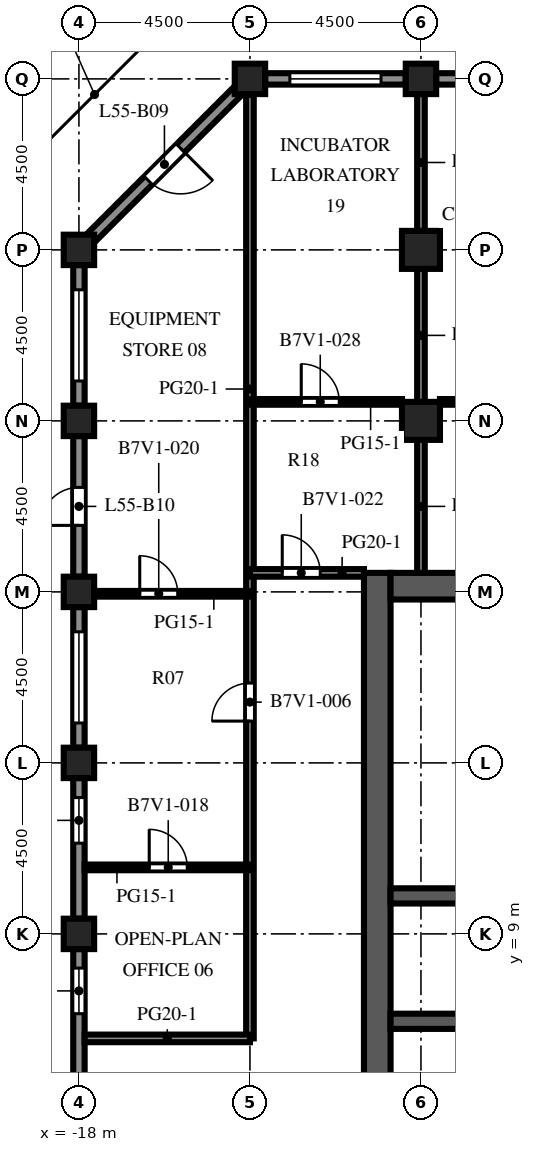
"""IFC4 building model, lengths in metres.
Left out: names, types, materials, properties, quantities, classifications, styles, units other than length and angle.
Written with IfcOpenShell. Run it as: python <this file> out.ifc"""

import sys

from ifc_helpers import new_model, si_unit, direction, frame, frame_2d, origin, origin_2d, place, context, subcontext, project, spatial, rectangle, extrude, element, fill, save


model = new_model("IFC4")
c1 = context("Model", 3, precision=1e-05, world=origin(), true_north=direction((0.0, 1.0)))
c2 = subcontext(c1, "Body", "Model", "MODEL_VIEW")
j1 = project(units=[si_unit("LENGTHUNIT", "METRE"), si_unit("PLANEANGLEUNIT", "RADIAN")], contexts=[c1])
p1 = place(None, origin())
s1 = spatial("IfcSite", under=j1, at=p1, CompositionType="ELEMENT")
p2 = place(p1, origin())
s2 = spatial("IfcBuilding", under=s1, at=p2, CompositionType="ELEMENT")
p3 = place(p2, frame((0.0, 0.0, 243.9)))
s3 = spatial("IfcBuildingStorey", under=s2, at=p3, CompositionType="ELEMENT", Elevation=243.9)
for number, where, z_axis, x_axis in (
    (1, (-18.0, 9.0, 0.0), (0.0, 0.0, 1.0), (1.0, 0.0, 0.0)),
    (2, (-18.0, 13.5, 0.0), (0.0, 0.0, 1.0), (1.0, 0.0, 0.0)),
    (3, (-18.0, 18.0, 0.0), (0.0, 0.0, 1.0), (1.0, 0.0, 0.0)),
    (4, (-18.0, 22.5, 0.0), (0.0, 0.0, 1.0), (1.0, 0.0, 0.0)),
    (5, (-18.0, 27.0, 0.0), (0.0, 0.0, 1.0), (1.0, 0.0, 0.0)),
    (6, (-13.5, 31.5, 0.0), (0.0, 0.0, 1.0), (1.0, 0.0, 0.0)),
    (7, (-9.0, 31.5, 0.0), (0.0, 0.0, 1.0), (1.0, 0.0, 0.0)),
):
    element("IfcColumn", number, at=place(p3, frame(where, z_axis=z_axis, x_axis=x_axis)), inside=s3, PredefinedType="COLUMN", context=c2, shape_type="SweptSolid", body=[
        extrude(rectangle(XDim=0.8, YDim=0.8, at=origin_2d()), origin(), (0.0, 0.0, 1.0), 4.1),
    ])
for number, where, z_axis, x_axis in (
    (8, (-9.0, 22.5, 0.0), (0.0, 0.0, 1.0), (1.0, 0.0, 0.0)),
    (9, (-9.0, 27.0, 0.0), (0.0, 0.0, 1.0), (1.0, 0.0, 0.0)),
):
    element("IfcColumn", number, at=place(p3, frame(where, z_axis=z_axis, x_axis=x_axis)), inside=s3, PredefinedType="COLUMN", context=c2, shape_type="SweptSolid", body=[
        extrude(rectangle(XDim=1.0, YDim=1.0, at=origin_2d()), origin(), (0.0, 0.0, 1.0), 4.1),
    ])
p4 = place(p3, frame((-10.15, -9.0, 0.0), z_axis=(0.0, 0.0, 1.0), x_axis=(0.0, 1.0, 0.0)))
e10 = element("IfcWall", 10, at=p4, inside=s3, PredefinedType="SHEAR", context=c2, shape_type="SweptSolid", body=[
    extrude(rectangle(XDim=27.5, YDim=0.7, at=frame_2d((13.75, 0.0))), origin(), (0.0, 0.0, 1.0), 4.1),
])
p5 = place(p4, frame((12.55, 0.0, 0.0)))
e11 = element("IfcOpeningElement", 11, at=p5, cuts=e10, PredefinedType="OPENING", context=c2, shape_type="SweptSolid", body=[
    extrude(rectangle(XDim=2.4, YDim=2.4, at=frame_2d((1.2, 1.2))), frame((0.0, 0.36, 0.0), z_axis=(0.0, -1.0, 0.0), x_axis=(1.0, 0.0, 0.0)), (0.0, 0.0, 1.0), 0.72),
])
p6 = place(p4, frame((6.825, 0.0, 0.0)))
e12 = element("IfcOpeningElement", 12, at=p6, cuts=e10, PredefinedType="OPENING", context=c2, shape_type="SweptSolid", body=[
    extrude(rectangle(XDim=1.2, YDim=2.1, at=frame_2d((0.6, 1.05))), frame((0.0, 0.36, 0.0), z_axis=(0.0, -1.0, 0.0), x_axis=(1.0, 0.0, 0.0)), (0.0, 0.0, 1.0), 0.72),
])
p7 = place(p4, frame((19.475, 0.0, 0.0)))
e13 = element("IfcOpeningElement", 13, at=p7, cuts=e10, PredefinedType="OPENING", context=c2, shape_type="SweptSolid", body=[
    extrude(rectangle(XDim=1.2, YDim=2.1, at=frame_2d((0.6, 1.05))), frame((0.0, 0.36, 0.0), z_axis=(0.0, -1.0, 0.0), x_axis=(1.0, 0.0, 0.0)), (0.0, 0.0, 1.0), 0.72),
])
p8 = place(p3, frame((-9.8, 18.15, 0.0), z_axis=(0.0, 0.0, 1.0), x_axis=(1.0, 0.0, 0.0)))
e14 = element("IfcWall", 14, at=p8, inside=s3, PredefinedType="SHEAR", context=c2, shape_type="SweptSolid", body=[
    extrude(rectangle(XDim=10.6, YDim=0.7, at=frame_2d((5.3, 0.0))), origin(), (0.0, 0.0, 1.0), 4.1),
])
p9 = place(p3, frame((-9.8, 6.7, 0.0), z_axis=(0.0, 0.0, 1.0), x_axis=(1.0, 0.0, 0.0)))
e15 = element("IfcWall", 15, at=p9, inside=s3, PredefinedType="SHEAR", context=c2, shape_type="SweptSolid", body=[
    extrude(rectangle(XDim=10.6, YDim=0.4, at=frame_2d((5.3, 0.0))), origin(), (0.0, 0.0, 1.0), 4.1),
])
p10 = place(p9, frame((3.438, 0.0, 0.0)))
e16 = element("IfcOpeningElement", 16, at=p10, cuts=e15, PredefinedType="OPENING", context=c2, shape_type="SweptSolid", body=[
    extrude(rectangle(XDim=1.1, YDim=2.1, at=frame_2d((0.55, 1.05))), frame((0.0, 0.21, 0.0), z_axis=(0.0, -1.0, 0.0), x_axis=(1.0, 0.0, 0.0)), (0.0, 0.0, 1.0), 0.42),
])
p11 = place(p9, frame((6.062, 0.0, 0.0)))
e17 = element("IfcOpeningElement", 17, at=p11, cuts=e15, PredefinedType="OPENING", context=c2, shape_type="SweptSolid", body=[
    extrude(rectangle(XDim=1.1, YDim=2.1, at=frame_2d((0.55, 1.05))), frame((0.0, 0.21, 0.0), z_axis=(0.0, -1.0, 0.0), x_axis=(1.0, 0.0, 0.0)), (0.0, 0.0, 1.0), 0.42),
])
p12 = place(p9, frame((8.812, 0.0, 0.0)))
e18 = element("IfcOpeningElement", 18, at=p12, cuts=e15, PredefinedType="OPENING", context=c2, shape_type="SweptSolid", body=[
    extrude(rectangle(XDim=1.1, YDim=2.1, at=frame_2d((0.55, 1.05))), frame((0.0, 0.21, 0.0), z_axis=(0.0, -1.0, 0.0), x_axis=(1.0, 0.0, 0.0)), (0.0, 0.0, 1.0), 0.42),
])
p13 = place(p9, frame((0.738, 0.0, 0.0)))
e19 = element("IfcOpeningElement", 19, at=p13, cuts=e15, PredefinedType="OPENING", context=c2, shape_type="SweptSolid", body=[
    extrude(rectangle(XDim=1.0, YDim=2.1, at=frame_2d((0.5, 1.05))), frame((0.0, 0.21, 0.0), z_axis=(0.0, -1.0, 0.0), x_axis=(1.0, 0.0, 0.0)), (0.0, 0.0, 1.0), 0.42),
])
p14 = place(p3, frame((-9.8, 10.0, 0.0), z_axis=(0.0, 0.0, 1.0), x_axis=(1.0, 0.0, 0.0)))
e20 = element("IfcWall", 20, at=p14, inside=s3, PredefinedType="SHEAR", context=c2, shape_type="SweptSolid", body=[
    extrude(rectangle(XDim=10.6, YDim=0.4, at=frame_2d((5.3, 0.0))), origin(), (0.0, 0.0, 1.0), 4.1),
])
p15 = place(p3, frame((-8.6, 31.5, 0.0), z_axis=(0.0, 0.0, 1.0), x_axis=(1.0, 0.0, 0.0)))
e21 = element("IfcWall", 21, at=p15, inside=s3, PredefinedType="SOLIDWALL", context=c2, shape_type="SweptSolid", body=[
    extrude(rectangle(XDim=3.7, YDim=0.3, at=frame_2d((1.85, 0.0))), origin(), (0.0, 0.0, 1.0), 2.85),
])
p16 = place(p15, frame((1.35, 0.0, 0.0)))
e22 = element("IfcOpeningElement", 22, at=p16, cuts=e21, PredefinedType="OPENING", context=c2, shape_type="SweptSolid", body=[
    extrude(rectangle(XDim=1.0, YDim=2.2, at=frame_2d((0.5, 1.1))), frame((0.0, 0.16, 0.0), z_axis=(0.0, -1.0, 0.0), x_axis=(1.0, 0.0, 0.0)), (0.0, 0.0, 1.0), 0.32),
])
p17 = place(p3, frame((-13.1, 31.5, 0.0), z_axis=(0.0, 0.0, 1.0), x_axis=(1.0, 0.0, 0.0)))
e23 = element("IfcWall", 23, at=p17, inside=s3, PredefinedType="SOLIDWALL", context=c2, shape_type="SweptSolid", body=[
    extrude(rectangle(XDim=3.7, YDim=0.3, at=frame_2d((1.85, 0.0))), origin(), (0.0, 0.0, 1.0), 2.85),
])
p18 = place(p17, frame((0.65, 0.0, 0.8)))
e24 = element("IfcOpeningElement", 24, at=p18, cuts=e23, PredefinedType="OPENING", context=c2, shape_type="SweptSolid", body=[
    extrude(rectangle(XDim=2.4, YDim=1.7, at=frame_2d((1.2, 0.85))), frame((0.0, 0.16, 0.0), z_axis=(0.0, -1.0, 0.0), x_axis=(1.0, 0.0, 0.0)), (0.0, 0.0, 1.0), 0.32),
])
p19 = place(p3, frame((-17.706, 27.294, 0.0), z_axis=(0.0, 0.0, 1.0), x_axis=(0.707106781187, 0.707106781187, 0.0)))
e25 = element("IfcWall", 25, at=p19, inside=s3, PredefinedType="SOLIDWALL", context=c2, shape_type="SweptSolid", body=[
    extrude(rectangle(XDim=5.532, YDim=0.3, at=frame_2d((2.766, 0.0))), origin(), (0.0, 0.0, 1.0), 2.85),
])
p20 = place(p19, frame((2.166, 0.0, 0.0)))
e26 = element("IfcOpeningElement", 26, at=p20, cuts=e25, PredefinedType="OPENING", context=c2, shape_type="SweptSolid", body=[
    extrude(rectangle(XDim=1.2, YDim=2.2, at=frame_2d((0.6, 1.1))), frame((0.0, 0.16, 0.0), z_axis=(0.0, -1.0, 0.0), x_axis=(1.0, 0.0, 0.0)), (0.0, 0.0, 1.0), 0.32),
])
p21 = place(p3, frame((-18.0, 22.9, 0.0), z_axis=(0.0, 0.0, 1.0), x_axis=(0.0, 1.0, 0.0)))
e27 = element("IfcWall", 27, at=p21, inside=s3, PredefinedType="SOLIDWALL", context=c2, shape_type="SweptSolid", body=[
    extrude(rectangle(XDim=3.7, YDim=0.3, at=frame_2d((1.85, 0.0))), origin(), (0.0, 0.0, 1.0), 2.85),
])
p22 = place(p21, frame((0.65, 0.0, 0.8)))
e28 = element("IfcOpeningElement", 28, at=p22, cuts=e27, PredefinedType="OPENING", context=c2, shape_type="SweptSolid", body=[
    extrude(rectangle(XDim=2.4, YDim=1.7, at=frame_2d((1.2, 0.85))), frame((0.0, 0.16, 0.0), z_axis=(0.0, -1.0, 0.0), x_axis=(1.0, 0.0, 0.0)), (0.0, 0.0, 1.0), 0.32),
])
p23 = place(p3, frame((-18.0, 18.4, 0.0), z_axis=(0.0, 0.0, 1.0), x_axis=(0.0, 1.0, 0.0)))
e29 = element("IfcWall", 29, at=p23, inside=s3, PredefinedType="SOLIDWALL", context=c2, shape_type="SweptSolid", body=[
    extrude(rectangle(XDim=3.7, YDim=0.3, at=frame_2d((1.85, 0.0))), origin(), (0.0, 0.0, 1.0), 2.85),
])
p24 = place(p23, frame((1.35, 0.0, 0.0)))
e30 = element("IfcOpeningElement", 30, at=p24, cuts=e29, PredefinedType="OPENING", context=c2, shape_type="SweptSolid", body=[
    extrude(rectangle(XDim=1.0, YDim=2.2, at=frame_2d((0.5, 1.1))), frame((0.0, 0.16, 0.0), z_axis=(0.0, -1.0, 0.0), x_axis=(1.0, 0.0, 0.0)), (0.0, 0.0, 1.0), 0.32),
])
p25 = place(p3, frame((-18.0, 13.9, 0.0), z_axis=(0.0, 0.0, 1.0), x_axis=(0.0, 1.0, 0.0)))
e31 = element("IfcWall", 31, at=p25, inside=s3, PredefinedType="SOLIDWALL", context=c2, shape_type="SweptSolid", body=[
    extrude(rectangle(XDim=3.7, YDim=0.3, at=frame_2d((1.85, 0.0))), origin(), (0.0, 0.0, 1.0), 2.85),
])
p26 = place(p25, frame((0.65, 0.0, 0.8)))
e32 = element("IfcOpeningElement", 32, at=p26, cuts=e31, PredefinedType="OPENING", context=c2, shape_type="SweptSolid", body=[
    extrude(rectangle(XDim=2.4, YDim=1.7, at=frame_2d((1.2, 0.85))), frame((0.0, 0.16, 0.0), z_axis=(0.0, -1.0, 0.0), x_axis=(1.0, 0.0, 0.0)), (0.0, 0.0, 1.0), 0.32),
])
p27 = place(p3, frame((-18.0, 9.4, 0.0), z_axis=(0.0, 0.0, 1.0), x_axis=(0.0, 1.0, 0.0)))
e33 = element("IfcWall", 33, at=p27, inside=s3, PredefinedType="SOLIDWALL", context=c2, shape_type="SweptSolid", body=[
    extrude(rectangle(XDim=3.7, YDim=0.3, at=frame_2d((1.85, 0.0))), origin(), (0.0, 0.0, 1.0), 2.85),
])
p28 = place(p27, frame((1.988, 0.0, 0.8)))
e34 = element("IfcOpeningElement", 34, at=p28, cuts=e33, PredefinedType="OPENING", context=c2, shape_type="SweptSolid", body=[
    extrude(rectangle(XDim=1.2, YDim=1.7, at=frame_2d((0.6, 0.85))), frame((0.0, 0.16, 0.0), z_axis=(0.0, -1.0, 0.0), x_axis=(1.0, 0.0, 0.0)), (0.0, 0.0, 1.0), 0.32),
])
p29 = place(p3, frame((-18.0, 4.9, 0.0), z_axis=(0.0, 0.0, 1.0), x_axis=(0.0, 1.0, 0.0)))
e35 = element("IfcWall", 35, at=p29, inside=s3, PredefinedType="SOLIDWALL", context=c2, shape_type="SweptSolid", body=[
    extrude(rectangle(XDim=3.7, YDim=0.3, at=frame_2d((1.85, 0.0))), origin(), (0.0, 0.0, 1.0), 2.85),
])
p30 = place(p29, frame((2.0, 0.0, 0.8)))
e36 = element("IfcOpeningElement", 36, at=p30, cuts=e35, PredefinedType="OPENING", context=c2, shape_type="SweptSolid", body=[
    extrude(rectangle(XDim=1.2, YDim=1.7, at=frame_2d((0.6, 0.85))), frame((0.0, 0.16, 0.0), z_axis=(0.0, -1.0, 0.0), x_axis=(1.0, 0.0, 0.0)), (0.0, 0.0, 1.0), 0.32),
])
p31 = place(p3, frame((-13.5, 6.25, 0.0), z_axis=(0.0, 0.0, 1.0), x_axis=(0.0, 1.0, 0.0)))
e37 = element("IfcWall", 37, at=p31, inside=s3, PredefinedType="PARTITIONING", context=c2, shape_type="SweptSolid", body=[
    extrude(rectangle(XDim=24.827, YDim=0.2, at=frame_2d((12.414, 0.0))), origin(), (0.0, 0.0, 1.0), 3.65),
])
p32 = place(p31, frame((8.35, 0.0, 0.0)))
e38 = element("IfcOpeningElement", 38, at=p32, cuts=e37, PredefinedType="OPENING", context=c2, shape_type="SweptSolid", body=[
    extrude(rectangle(XDim=1.0, YDim=2.1, at=frame_2d((0.5, 1.05))), frame((0.0, 0.11, 0.0), z_axis=(0.0, -1.0, 0.0), x_axis=(1.0, 0.0, 0.0)), (0.0, 0.0, 1.0), 0.22),
])
for number, where, z_axis, x_axis in (
    (39, (-9.0, 18.5, 0.0), (0.0, 0.0, 1.0), (0.0, 1.0, 0.0)),
    (40, (-9.0, 23.0, 0.0), (0.0, 0.0, 1.0), (0.0, 1.0, 0.0)),
):
    element("IfcWall", number, at=place(p3, frame(where, z_axis=z_axis, x_axis=x_axis)), inside=s3, PredefinedType="PARTITIONING", context=c2, shape_type="SweptSolid", body=[
        extrude(rectangle(XDim=3.5, YDim=0.2, at=frame_2d((1.75, 0.0))), origin(), (0.0, 0.0, 1.0), 3.65),
    ])
p33 = place(p3, frame((-9.0, 27.5, 0.0), z_axis=(0.0, 0.0, 1.0), x_axis=(0.0, 1.0, 0.0)))
e41 = element("IfcWall", 41, at=p33, inside=s3, PredefinedType="PARTITIONING", context=c2, shape_type="SweptSolid", body=[
    extrude(rectangle(XDim=3.6, YDim=0.2, at=frame_2d((1.8, 0.0))), origin(), (0.0, 0.0, 1.0), 3.65),
])
p34 = place(p3, frame((-17.85, 6.25, 0.0), z_axis=(0.0, 0.0, 1.0), x_axis=(1.0, 0.0, 0.0)))
e42 = element("IfcWall", 42, at=p34, inside=s3, PredefinedType="PARTITIONING", context=c2, shape_type="SweptSolid", body=[
    extrude(rectangle(XDim=4.35, YDim=0.2, at=frame_2d((2.175, 0.0))), origin(), (0.0, 0.0, 1.0), 3.65),
])
p35 = place(p3, frame((-13.5, 10.75, 0.0), z_axis=(0.0, 0.0, 1.0), x_axis=(-1.0, 0.0, 0.0)))
e43 = element("IfcWall", 43, at=p35, inside=s3, PredefinedType="PARTITIONING", context=c2, shape_type="SweptSolid", body=[
    extrude(rectangle(XDim=4.35, YDim=0.15, at=frame_2d((2.175, 0.0))), origin(), (0.0, 0.0, 1.0), 3.65),
])
p36 = place(p35, frame((1.65, 0.0, 0.0)))
e44 = element("IfcOpeningElement", 44, at=p36, cuts=e43, PredefinedType="OPENING", context=c2, shape_type="SweptSolid", body=[
    extrude(rectangle(XDim=1.0, YDim=2.1, at=frame_2d((0.5, 1.05))), frame((0.0, 0.085, 0.0), z_axis=(0.0, -1.0, 0.0), x_axis=(1.0, 0.0, 0.0)), (0.0, 0.0, 1.0), 0.17),
])
p37 = place(p3, frame((-17.6, 17.95, 0.0), z_axis=(0.0, 0.0, 1.0), x_axis=(1.0, 0.0, 0.0)))
e45 = element("IfcWall", 45, at=p37, inside=s3, PredefinedType="PARTITIONING", context=c2, shape_type="SweptSolid", body=[
    extrude(rectangle(XDim=4.1, YDim=0.15, at=frame_2d((2.05, 0.0))), origin(), (0.0, 0.0, 1.0), 3.65),
])
p38 = place(p37, frame((1.2, 0.0, 0.0)))
e46 = element("IfcOpeningElement", 46, at=p38, cuts=e45, PredefinedType="OPENING", context=c2, shape_type="SweptSolid", body=[
    extrude(rectangle(XDim=1.0, YDim=2.1, at=frame_2d((0.5, 1.05))), frame((0.0, 0.085, 0.0), z_axis=(0.0, -1.0, 0.0), x_axis=(1.0, 0.0, 0.0)), (0.0, 0.0, 1.0), 0.17),
])
p39 = place(p3, frame((-13.5, 18.5, 0.0), z_axis=(0.0, 0.0, 1.0), x_axis=(1.0, 0.0, 0.0)))
e47 = element("IfcWall", 47, at=p39, inside=s3, PredefinedType="PARTITIONING", context=c2, shape_type="SweptSolid", body=[
    extrude(rectangle(XDim=3.0, YDim=0.2, at=frame_2d((1.5, 0.0))), origin(), (0.0, 0.0, 1.0), 3.65),
])
p40 = place(p39, frame((0.85, 0.0, 0.0)))
e48 = element("IfcOpeningElement", 48, at=p40, cuts=e47, PredefinedType="OPENING", context=c2, shape_type="SweptSolid", body=[
    extrude(rectangle(XDim=1.0, YDim=2.1, at=frame_2d((0.5, 1.05))), frame((0.0, 0.11, 0.0), z_axis=(0.0, -1.0, 0.0), x_axis=(1.0, 0.0, 0.0)), (0.0, 0.0, 1.0), 0.22),
])
p41 = place(p3, frame((-13.5, 23.0, 0.0), z_axis=(0.0, 0.0, 1.0), x_axis=(1.0, 0.0, 0.0)))
e49 = element("IfcWall", 49, at=p41, inside=s3, PredefinedType="PARTITIONING", context=c2, shape_type="SweptSolid", body=[
    extrude(rectangle(XDim=4.0, YDim=0.15, at=frame_2d((2.0, 0.0))), origin(), (0.0, 0.0, 1.0), 3.65),
])
p42 = place(p41, frame((1.35, 0.0, 0.0)))
e50 = element("IfcOpeningElement", 50, at=p42, cuts=e49, PredefinedType="OPENING", context=c2, shape_type="SweptSolid", body=[
    extrude(rectangle(XDim=1.0, YDim=2.1, at=frame_2d((0.5, 1.05))), frame((0.0, 0.085, 0.0), z_axis=(0.0, -1.0, 0.0), x_axis=(1.0, 0.0, 0.0)), (0.0, 0.0, 1.0), 0.17),
])
p43 = place(p3, frame((-8.5, 23.0, 0.0), z_axis=(0.0, 0.0, 1.0), x_axis=(1.0, 0.0, 0.0)))
e51 = element("IfcWall", 51, at=p43, inside=s3, PredefinedType="PARTITIONING", context=c2, shape_type="SweptSolid", body=[
    extrude(rectangle(XDim=8.0, YDim=0.15, at=frame_2d((4.0, 0.0))), origin(), (0.0, 0.0, 1.0), 3.65),
])
p44 = place(p43, frame((6.35, 0.0, 0.0)))
e52 = element("IfcOpeningElement", 52, at=p44, cuts=e51, PredefinedType="OPENING", context=c2, shape_type="SweptSolid", body=[
    extrude(rectangle(XDim=1.0, YDim=2.1, at=frame_2d((0.5, 1.05))), frame((0.0, 0.085, 0.0), z_axis=(0.0, -1.0, 0.0), x_axis=(1.0, 0.0, 0.0)), (0.0, 0.0, 1.0), 0.17),
])
p45 = place(p18, origin())
e53 = element("IfcWindow", 53, at=p45, inside=s3, PartitioningType="SINGLE_PANEL", PredefinedType="WINDOW", context=c2, shape_type="SweptSolid", body=[
    extrude(rectangle(XDim=2.4, YDim=1.7, at=frame_2d((1.2, 0.85))), frame((0.0, 0.03, 0.0), z_axis=(0.0, -1.0, 0.0), x_axis=(1.0, 0.0, 0.0)), (0.0, 0.0, 1.0), 0.06),
])
fill(e24, e53)
p46 = place(p20, origin())
e54 = element("IfcDoor", 54, at=p46, inside=s3, OperationType="SINGLE_SWING_RIGHT", PredefinedType="DOOR", context=c2, shape_type="SweptSolid", body=[
    extrude(rectangle(XDim=1.2, YDim=2.2, at=frame_2d((0.6, 1.1))), frame((0.0, 0.025, 0.0), z_axis=(0.0, -1.0, 0.0), x_axis=(1.0, 0.0, 0.0)), (0.0, 0.0, 1.0), 0.05),
])
fill(e26, e54)
p47 = place(p22, origin())
e55 = element("IfcWindow", 55, at=p47, inside=s3, PartitioningType="SINGLE_PANEL", PredefinedType="WINDOW", context=c2, shape_type="SweptSolid", body=[
    extrude(rectangle(XDim=2.4, YDim=1.7, at=frame_2d((1.2, 0.85))), frame((0.0, 0.03, 0.0), z_axis=(0.0, -1.0, 0.0), x_axis=(1.0, 0.0, 0.0)), (0.0, 0.0, 1.0), 0.06),
])
fill(e28, e55)
p48 = place(p24, origin())
e56 = element("IfcDoor", 56, at=p48, inside=s3, OperationType="SINGLE_SWING_LEFT", PredefinedType="DOOR", context=c2, shape_type="SweptSolid", body=[
    extrude(rectangle(XDim=1.0, YDim=2.2, at=frame_2d((0.5, 1.1))), frame((0.0, 0.025, 0.0), z_axis=(0.0, -1.0, 0.0), x_axis=(1.0, 0.0, 0.0)), (0.0, 0.0, 1.0), 0.05),
])
fill(e30, e56)
p49 = place(p26, origin())
e57 = element("IfcWindow", 57, at=p49, inside=s3, PartitioningType="SINGLE_PANEL", PredefinedType="WINDOW", context=c2, shape_type="SweptSolid", body=[
    extrude(rectangle(XDim=2.4, YDim=1.7, at=frame_2d((1.2, 0.85))), frame((0.0, 0.03, 0.0), z_axis=(0.0, -1.0, 0.0), x_axis=(1.0, 0.0, 0.0)), (0.0, 0.0, 1.0), 0.06),
])
fill(e32, e57)
p50 = place(p28, origin())
e58 = element("IfcWindow", 58, at=p50, inside=s3, PartitioningType="SINGLE_PANEL", PredefinedType="WINDOW", context=c2, shape_type="SweptSolid", body=[
    extrude(rectangle(XDim=1.2, YDim=1.7, at=frame_2d((0.6, 0.85))), frame((0.0, 0.03, 0.0), z_axis=(0.0, -1.0, 0.0), x_axis=(1.0, 0.0, 0.0)), (0.0, 0.0, 1.0), 0.06),
])
fill(e34, e58)
p51 = place(p30, origin())
e59 = element("IfcWindow", 59, at=p51, inside=s3, PartitioningType="SINGLE_PANEL", PredefinedType="WINDOW", context=c2, shape_type="SweptSolid", body=[
    extrude(rectangle(XDim=1.2, YDim=1.7, at=frame_2d((0.6, 0.85))), frame((0.0, 0.03, 0.0), z_axis=(0.0, -1.0, 0.0), x_axis=(1.0, 0.0, 0.0)), (0.0, 0.0, 1.0), 0.06),
])
fill(e36, e59)
p52 = place(p5, origin())
e60 = element("IfcDoor", 60, at=p52, inside=s3, OperationType="DOUBLE_DOOR_DOUBLE_SWING", PredefinedType="DOOR", context=c2, shape_type="SweptSolid", body=[
    extrude(rectangle(XDim=2.4, YDim=2.4, at=frame_2d((1.2, 1.2))), frame((0.0, 0.025, 0.0), z_axis=(0.0, -1.0, 0.0), x_axis=(1.0, 0.0, 0.0)), (0.0, 0.0, 1.0), 0.05),
])
fill(e11, e60)
p53 = place(p7, origin())
e61 = element("IfcDoor", 61, at=p53, inside=s3, OperationType="SINGLE_SWING_LEFT", PredefinedType="DOOR", context=c2, shape_type="SweptSolid", body=[
    extrude(rectangle(XDim=1.2, YDim=2.1, at=frame_2d((0.6, 1.05))), frame((0.0, 0.025, 0.0), z_axis=(0.0, -1.0, 0.0), x_axis=(1.0, 0.0, 0.0)), (0.0, 0.0, 1.0), 0.05),
])
fill(e13, e61)
p54 = place(p13, origin())
e62 = element("IfcDoor", 62, at=p54, inside=s3, OperationType="SINGLE_SWING_LEFT", PredefinedType="DOOR", context=c2, shape_type="SweptSolid", body=[
    extrude(rectangle(XDim=1.0, YDim=2.1, at=frame_2d((0.5, 1.05))), frame((0.0, 0.025, 0.0), z_axis=(0.0, -1.0, 0.0), x_axis=(1.0, 0.0, 0.0)), (0.0, 0.0, 1.0), 0.05),
])
fill(e19, e62)
p55 = place(p32, origin())
e63 = element("IfcDoor", 63, at=p55, inside=s3, OperationType="SINGLE_SWING_LEFT", PredefinedType="DOOR", context=c2, shape_type="SweptSolid", body=[
    extrude(rectangle(XDim=1.0, YDim=2.1, at=frame_2d((0.5, 1.05))), frame((0.0, 0.025, 0.0), z_axis=(0.0, -1.0, 0.0), x_axis=(1.0, 0.0, 0.0)), (0.0, 0.0, 1.0), 0.05),
])
fill(e38, e63)
p56 = place(p36, origin())
e64 = element("IfcDoor", 64, at=p56, inside=s3, OperationType="SINGLE_SWING_RIGHT", PredefinedType="DOOR", context=c2, shape_type="SweptSolid", body=[
    extrude(rectangle(XDim=1.0, YDim=2.1, at=frame_2d((0.5, 1.05))), frame((0.0, 0.025, 0.0), z_axis=(0.0, -1.0, 0.0), x_axis=(1.0, 0.0, 0.0)), (0.0, 0.0, 1.0), 0.05),
])
fill(e44, e64)
p57 = place(p38, origin())
e65 = element("IfcDoor", 65, at=p57, inside=s3, OperationType="SINGLE_SWING_LEFT", PredefinedType="DOOR", context=c2, shape_type="SweptSolid", body=[
    extrude(rectangle(XDim=1.0, YDim=2.1, at=frame_2d((0.5, 1.05))), frame((0.0, 0.025, 0.0), z_axis=(0.0, -1.0, 0.0), x_axis=(1.0, 0.0, 0.0)), (0.0, 0.0, 1.0), 0.05),
])
fill(e46, e65)
p58 = place(p40, origin())
e66 = element("IfcDoor", 66, at=p58, inside=s3, OperationType="SINGLE_SWING_LEFT", PredefinedType="DOOR", context=c2, shape_type="SweptSolid", body=[
    extrude(rectangle(XDim=1.0, YDim=2.1, at=frame_2d((0.5, 1.05))), frame((0.0, 0.025, 0.0), z_axis=(0.0, -1.0, 0.0), x_axis=(1.0, 0.0, 0.0)), (0.0, 0.0, 1.0), 0.05),
])
fill(e48, e66)
p59 = place(p42, origin())
e67 = element("IfcDoor", 67, at=p59, inside=s3, OperationType="SINGLE_SWING_LEFT", PredefinedType="DOOR", context=c2, shape_type="SweptSolid", body=[
    extrude(rectangle(XDim=1.0, YDim=2.1, at=frame_2d((0.5, 1.05))), frame((0.0, 0.025, 0.0), z_axis=(0.0, -1.0, 0.0), x_axis=(1.0, 0.0, 0.0)), (0.0, 0.0, 1.0), 0.05),
])
fill(e50, e67)
save(model, sys.argv[1])
